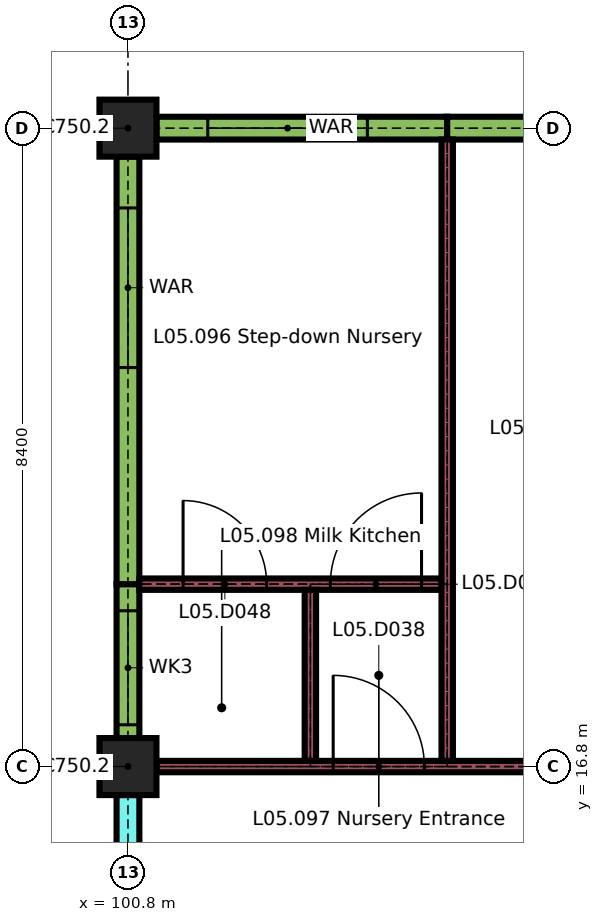
"""IFC4 building model, lengths in metres.
Left out: names, types, materials, properties, quantities, classifications, styles, units other than length and angle.
Written with IfcOpenShell. Run it as: python <this file> out.ifc"""

import sys

from ifc_helpers import new_model, si_unit, direction, frame, frame_2d, origin, origin_2d, place, context, subcontext, project, spatial, rectangle, extrude, element, fill, save


model = new_model("IFC4")
c1 = context("Model", 3, precision=1e-05, world=origin(), true_north=direction((0.0, 1.0)))
c2 = subcontext(c1, "Body", "Model", "MODEL_VIEW")
j1 = project(units=[si_unit("LENGTHUNIT", "METRE"), si_unit("PLANEANGLEUNIT", "RADIAN")], contexts=[c1])
p1 = place(None, origin())
s1 = spatial("IfcSite", under=j1, at=p1, CompositionType="ELEMENT")
p2 = place(p1, origin())
s2 = spatial("IfcBuilding", under=s1, at=p2, CompositionType="ELEMENT")
p3 = place(p2, frame((0.0, 0.0, 22.5)))
s3 = spatial("IfcBuildingStorey", under=s2, at=p3, CompositionType="ELEMENT", Elevation=22.5)
for number, where, z_axis, x_axis in (
    (1, (100.8, 16.8, 0.0), (0.0, 0.0, 1.0), (1.0, 0.0, 0.0)),
    (2, (100.8, 25.2, 0.0), (0.0, 0.0, 1.0), (1.0, 0.0, 0.0)),
):
    element("IfcColumn", number, at=place(p3, frame(where, z_axis=z_axis, x_axis=x_axis)), inside=s3, PredefinedType="COLUMN", context=c2, shape_type="SweptSolid", body=[
        extrude(rectangle(XDim=0.75, YDim=0.75, at=origin_2d()), origin(), (0.0, 0.0, 1.0), 3.26),
    ])
p4 = place(p3, frame((101.175, 25.2, 0.0), z_axis=(0.0, 0.0, 1.0), x_axis=(1.0, 0.0, 0.0)))
e3 = element("IfcWall", 3, at=p4, inside=s3, PredefinedType="SOLIDWALL", context=c2, shape_type="SweptSolid", body=[
    extrude(rectangle(XDim=3.825, YDim=0.3, at=frame_2d((1.913, 0.0))), origin(), (0.0, 0.0, 1.0), 2.96),
])
p5 = place(p4, frame((0.675, 0.0, 0.9)))
e4 = element("IfcOpeningElement", 4, at=p5, cuts=e3, PredefinedType="OPENING", context=c2, shape_type="SweptSolid", body=[
    extrude(rectangle(XDim=2.1, YDim=1.5, at=frame_2d((1.05, 0.75))), frame((0.0, 0.16, 0.0), z_axis=(0.0, -1.0, 0.0), x_axis=(1.0, 0.0, 0.0)), (0.0, 0.0, 1.0), 0.32),
])
p6 = place(p3, frame((105.0, 25.2, 0.0), z_axis=(0.0, 0.0, 1.0), x_axis=(1.0, 0.0, 0.0)))
e5 = element("IfcWall", 5, at=p6, inside=s3, PredefinedType="SOLIDWALL", context=c2, shape_type="SweptSolid", body=[
    extrude(rectangle(XDim=3.825, YDim=0.3, at=frame_2d((1.913, 0.0))), origin(), (0.0, 0.0, 1.0), 2.96),
])
p7 = place(p6, frame((1.05, 0.0, 0.9)))
e6 = element("IfcOpeningElement", 6, at=p7, cuts=e5, PredefinedType="OPENING", context=c2, shape_type="SweptSolid", body=[
    extrude(rectangle(XDim=2.1, YDim=1.5, at=frame_2d((1.05, 0.75))), frame((0.0, 0.16, 0.0), z_axis=(0.0, -1.0, 0.0), x_axis=(1.0, 0.0, 0.0)), (0.0, 0.0, 1.0), 0.32),
])
p8 = place(p3, frame((100.8, 13.8, 0.0), z_axis=(0.0, 0.0, 1.0), x_axis=(0.0, 1.0, 0.0)))
e7 = element("IfcWall", 7, at=p8, inside=s3, PredefinedType="SOLIDWALL", context=c2, shape_type="SweptSolid", body=[
    extrude(rectangle(XDim=2.625, YDim=0.3, at=frame_2d((1.312, 0.0))), origin(), (0.0, 0.0, 1.0), 3.26),
])
p9 = place(p8, frame((0.45, 0.0, 0.9)))
e8 = element("IfcOpeningElement", 8, at=p9, cuts=e7, PredefinedType="OPENING", context=c2, shape_type="SweptSolid", body=[
    extrude(rectangle(XDim=0.9, YDim=1.5, at=frame_2d((0.45, 0.75))), frame((0.0, 0.16, 0.0), z_axis=(0.0, -1.0, 0.0), x_axis=(1.0, 0.0, 0.0)), (0.0, 0.0, 1.0), 0.32),
])
p10 = place(p3, frame((100.8, 17.175, 0.0), z_axis=(0.0, 0.0, 1.0), x_axis=(0.0, 1.0, 0.0)))
e9 = element("IfcWall", 9, at=p10, inside=s3, PredefinedType="SOLIDWALL", context=c2, shape_type="SweptSolid", body=[
    extrude(rectangle(XDim=2.025, YDim=0.3, at=frame_2d((1.012, 0.0))), origin(), (0.0, 0.0, 1.0), 2.96),
])
p11 = place(p10, frame((0.175, 0.0, 1.2)))
e10 = element("IfcOpeningElement", 10, at=p11, cuts=e9, PredefinedType="OPENING", context=c2, shape_type="SweptSolid", body=[
    extrude(rectangle(XDim=1.5, YDim=0.9, at=frame_2d((0.75, 0.45))), frame((0.0, 0.16, 0.0), z_axis=(0.0, -1.0, 0.0), x_axis=(1.0, 0.0, 0.0)), (0.0, 0.0, 1.0), 0.32),
])
p12 = place(p3, frame((100.8, 19.2, 0.0), z_axis=(0.0, 0.0, 1.0), x_axis=(0.0, 1.0, 0.0)))
e11 = element("IfcWall", 11, at=p12, inside=s3, PredefinedType="SOLIDWALL", context=c2, shape_type="SweptSolid", body=[
    extrude(rectangle(XDim=5.625, YDim=0.3, at=frame_2d((2.812, 0.0))), origin(), (0.0, 0.0, 1.0), 2.96),
])
p13 = place(p12, frame((2.85, 0.0, 0.9)))
e12 = element("IfcOpeningElement", 12, at=p13, cuts=e11, PredefinedType="OPENING", context=c2, shape_type="SweptSolid", body=[
    extrude(rectangle(XDim=2.1, YDim=1.5, at=frame_2d((1.05, 0.75))), frame((0.0, 0.16, 0.0), z_axis=(0.0, -1.0, 0.0), x_axis=(1.0, 0.0, 0.0)), (0.0, 0.0, 1.0), 0.32),
])
p14 = place(p3, frame((101.175, 16.8, 0.0), z_axis=(0.0, 0.0, 1.0), x_axis=(1.0, 0.0, 0.0)))
e13 = element("IfcWall", 13, at=p14, inside=s3, PredefinedType="PARTITIONING", context=c2, shape_type="SweptSolid", body=[
    extrude(rectangle(XDim=7.65, YDim=0.15, at=frame_2d((3.825, 0.0))), origin(), (0.0, 0.0, 1.0), 3.26),
])
p15 = place(p14, frame((2.325, 0.0, 0.0)))
e14 = element("IfcOpeningElement", 14, at=p15, cuts=e13, PredefinedType="OPENING", context=c2, shape_type="SweptSolid", body=[
    extrude(rectangle(XDim=1.2, YDim=2.1, at=frame_2d((0.6, 1.05))), frame((0.0, 0.085, 0.0), z_axis=(0.0, -1.0, 0.0), x_axis=(1.0, 0.0, 0.0)), (0.0, 0.0, 1.0), 0.17),
])
p16 = place(p14, frame((5.188, 0.0, 0.0)))
e15 = element("IfcOpeningElement", 15, at=p16, cuts=e13, PredefinedType="OPENING", context=c2, shape_type="SweptSolid", body=[
    extrude(rectangle(XDim=1.1, YDim=2.1, at=frame_2d((0.55, 1.05))), frame((0.0, 0.085, 0.0), z_axis=(0.0, -1.0, 0.0), x_axis=(1.0, 0.0, 0.0)), (0.0, 0.0, 1.0), 0.17),
])
p17 = place(p3, frame((100.95, 19.2, 0.0), z_axis=(0.0, 0.0, 1.0), x_axis=(1.0, 0.0, 0.0)))
e16 = element("IfcWall", 16, at=p17, inside=s3, PredefinedType="PARTITIONING", context=c2, shape_type="SweptSolid", body=[
    extrude(rectangle(XDim=3.975, YDim=0.15, at=frame_2d((1.988, 0.0))), origin(), (0.0, 0.0, 1.0), 3.26),
])
p18 = place(p17, frame((0.575, 0.0, 0.0)))
e17 = element("IfcOpeningElement", 17, at=p18, cuts=e16, PredefinedType="OPENING", context=c2, shape_type="SweptSolid", body=[
    extrude(rectangle(XDim=1.1, YDim=2.1, at=frame_2d((0.55, 1.05))), frame((0.0, 0.085, 0.0), z_axis=(0.0, -1.0, 0.0), x_axis=(1.0, 0.0, 0.0)), (0.0, 0.0, 1.0), 0.17),
])
p19 = place(p17, frame((2.512, 0.0, 0.0)))
e18 = element("IfcOpeningElement", 18, at=p19, cuts=e16, PredefinedType="OPENING", context=c2, shape_type="SweptSolid", body=[
    extrude(rectangle(XDim=1.2, YDim=2.1, at=frame_2d((0.6, 1.05))), frame((0.0, 0.085, 0.0), z_axis=(0.0, -1.0, 0.0), x_axis=(1.0, 0.0, 0.0)), (0.0, 0.0, 1.0), 0.17),
])
p20 = place(p3, frame((103.2, 16.875, 0.0), z_axis=(0.0, 0.0, 1.0), x_axis=(0.0, 1.0, 0.0)))
e19 = element("IfcWall", 19, at=p20, inside=s3, PredefinedType="PARTITIONING", context=c2, shape_type="SweptSolid", body=[
    extrude(rectangle(XDim=2.25, YDim=0.15, at=frame_2d((1.125, 0.0))), origin(), (0.0, 0.0, 1.0), 3.26),
])
p21 = place(p3, frame((105.0, 16.875, 0.0), z_axis=(0.0, 0.0, 1.0), x_axis=(0.0, 1.0, 0.0)))
e20 = element("IfcWall", 20, at=p21, inside=s3, PredefinedType="PARTITIONING", context=c2, shape_type="SweptSolid", body=[
    extrude(rectangle(XDim=8.175, YDim=0.15, at=frame_2d((4.087, 0.0))), origin(), (0.0, 0.0, 1.0), 3.26),
])
p22 = place(p5, origin())
e21 = element("IfcWindow", 21, at=p22, inside=s3, PartitioningType="DOUBLE_PANEL_VERTICAL", PredefinedType="WINDOW", context=c2, shape_type="SweptSolid", body=[
    extrude(rectangle(XDim=2.1, YDim=1.5, at=frame_2d((1.05, 0.75))), frame((0.0, 0.05, 0.0), z_axis=(0.0, -1.0, 0.0), x_axis=(1.0, 0.0, 0.0)), (0.0, 0.0, 1.0), 0.1),
])
fill(e4, e21)
p23 = place(p11, origin())
e22 = element("IfcWindow", 22, at=p23, inside=s3, PartitioningType="DOUBLE_PANEL_VERTICAL", PredefinedType="WINDOW", context=c2, shape_type="SweptSolid", body=[
    extrude(rectangle(XDim=1.5, YDim=0.9, at=frame_2d((0.75, 0.45))), frame((0.0, 0.03, 0.0), z_axis=(0.0, -1.0, 0.0), x_axis=(1.0, 0.0, 0.0)), (0.0, 0.0, 1.0), 0.06),
])
fill(e10, e22)
p24 = place(p13, origin())
e23 = element("IfcWindow", 23, at=p24, inside=s3, PartitioningType="DOUBLE_PANEL_VERTICAL", PredefinedType="WINDOW", context=c2, shape_type="SweptSolid", body=[
    extrude(rectangle(XDim=2.1, YDim=1.5, at=frame_2d((1.05, 0.75))), frame((0.0, 0.05, 0.0), z_axis=(0.0, -1.0, 0.0), x_axis=(1.0, 0.0, 0.0)), (0.0, 0.0, 1.0), 0.1),
])
fill(e12, e23)
p25 = place(p15, origin())
e24 = element("IfcDoor", 24, at=p25, inside=s3, OperationType="SINGLE_SWING_RIGHT", PredefinedType="DOOR", context=c2, shape_type="SweptSolid", body=[
    extrude(rectangle(XDim=1.2, YDim=2.1, at=frame_2d((0.6, 1.05))), frame((0.0, 0.05, 0.0), z_axis=(0.0, -1.0, 0.0), x_axis=(1.0, 0.0, 0.0)), (0.0, 0.0, 1.0), 0.1),
])
fill(e14, e24)
p26 = place(p18, origin())
e25 = element("IfcDoor", 25, at=p26, inside=s3, OperationType="SINGLE_SWING_RIGHT", PredefinedType="DOOR", context=c2, shape_type="SweptSolid", body=[
    extrude(rectangle(XDim=1.1, YDim=2.1, at=frame_2d((0.55, 1.05))), frame((0.0, 0.025, 0.0), z_axis=(0.0, -1.0, 0.0), x_axis=(1.0, 0.0, 0.0)), (0.0, 0.0, 1.0), 0.05),
])
fill(e17, e25)
p27 = place(p19, origin())
e26 = element("IfcDoor", 26, at=p27, inside=s3, OperationType="SINGLE_SWING_LEFT", PredefinedType="DOOR", context=c2, shape_type="SweptSolid", body=[
    extrude(rectangle(XDim=1.2, YDim=2.1, at=frame_2d((0.6, 1.05))), frame((0.0, 0.05, 0.0), z_axis=(0.0, -1.0, 0.0), x_axis=(1.0, 0.0, 0.0)), (0.0, 0.0, 1.0), 0.1),
])
fill(e18, e26)
save(model, sys.argv[1])
